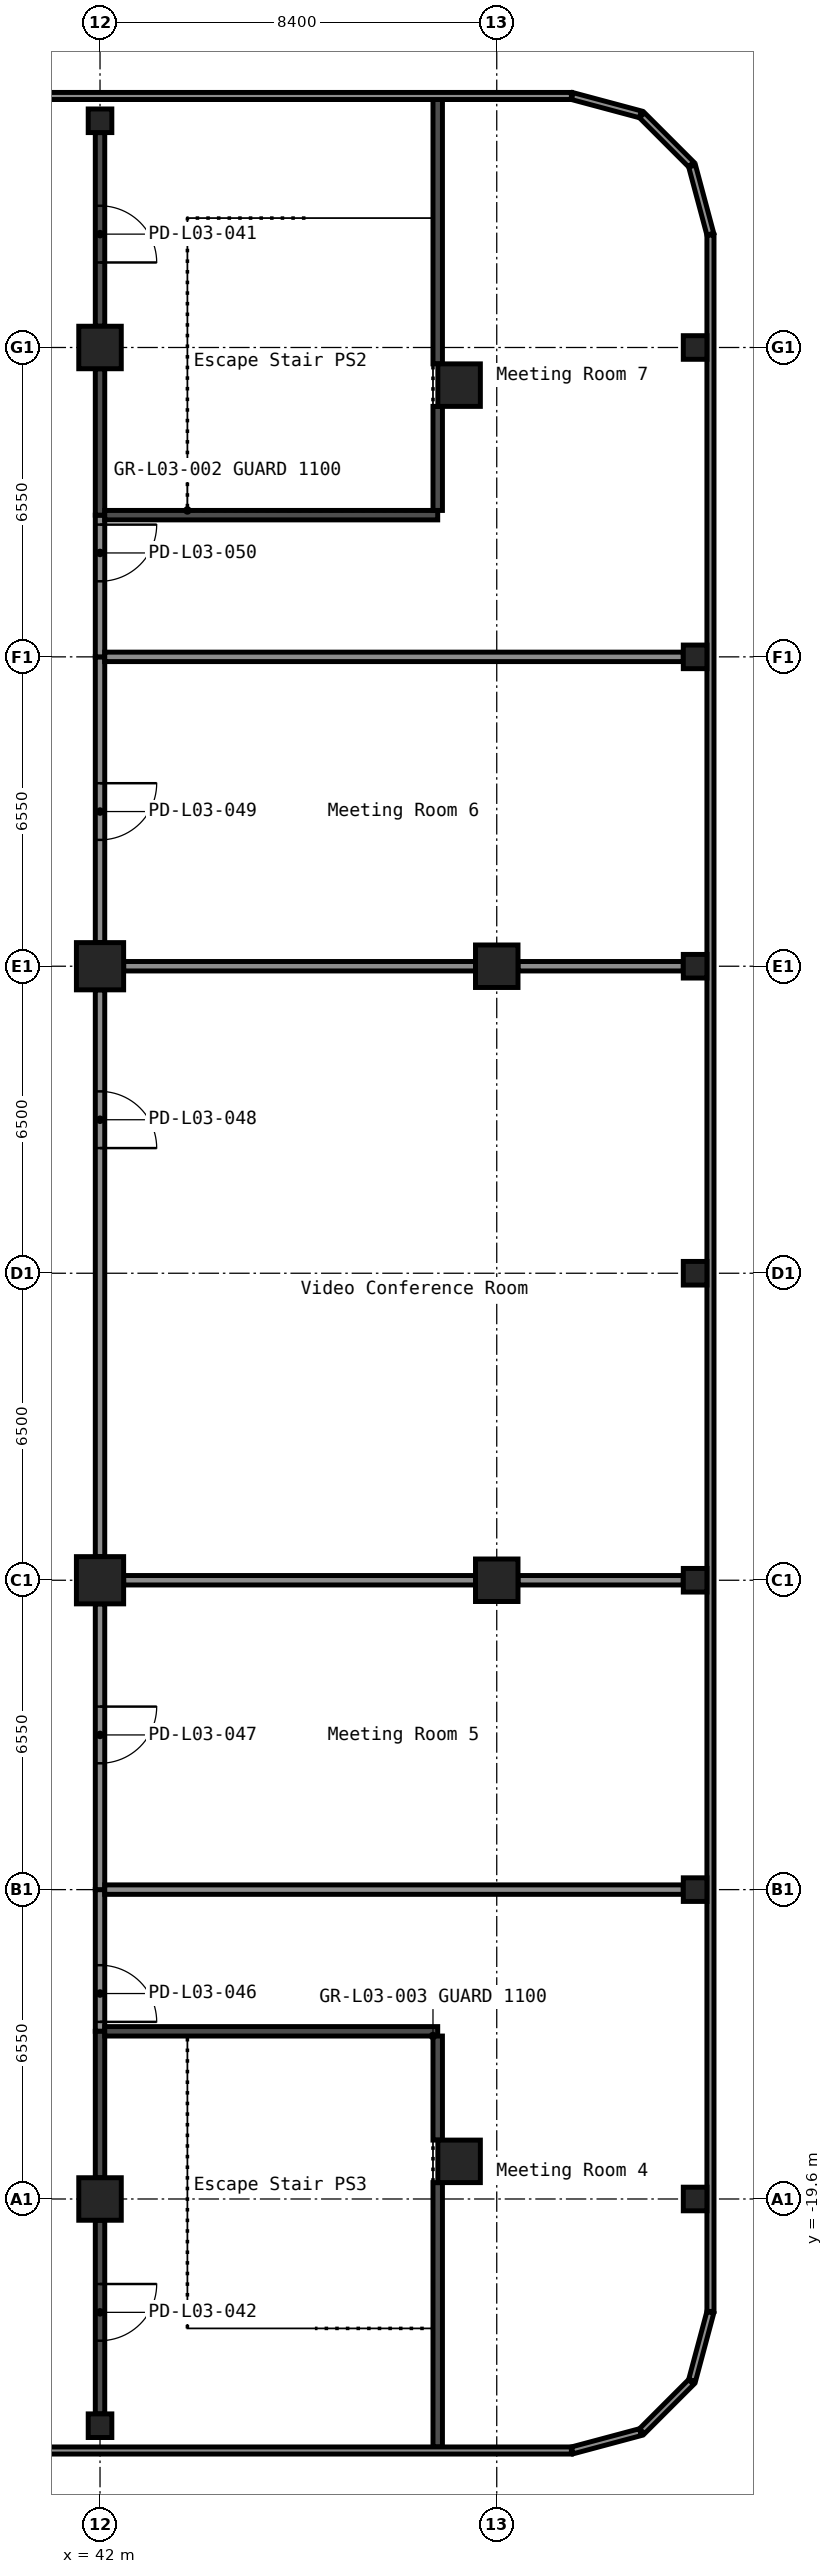
"""IFC4 building model, lengths in metres.
Left out: names, types, materials, properties, quantities, classifications, styles, units other than length and angle.
Written with IfcOpenShell. Run it as: python <this file> out.ifc"""

import sys

from ifc_helpers import new_model, si_unit, direction, frame, frame_2d, origin, origin_2d, place, context, subcontext, project, spatial, rectangle, hollow_rectangle, extrude, element, fill, save


model = new_model("IFC4")
c1 = context("Model", 3, precision=1e-05, world=origin(), true_north=direction((0.0, 1.0)))
c2 = subcontext(c1, "Body", "Model", "MODEL_VIEW")
j1 = project(units=[si_unit("LENGTHUNIT", "METRE"), si_unit("PLANEANGLEUNIT", "RADIAN")], contexts=[c1])
p1 = place(None, origin())
s1 = spatial("IfcSite", under=j1, at=p1, CompositionType="ELEMENT")
p2 = place(p1, origin())
s2 = spatial("IfcBuilding", under=s1, at=p2, CompositionType="ELEMENT")
p3 = place(p2, frame((0.0, 0.0, 15.0)))
s3 = spatial("IfcBuildingStorey", under=s2, at=p3, CompositionType="ELEMENT", Elevation=15.0)
p4 = place(p3, frame((42.0, -19.6, 0.0), z_axis=(0.0, 0.0, 1.0), x_axis=(1.0, 0.0, 0.0)))
e1 = element("IfcColumn", 1, at=p4, inside=s3, PredefinedType="COLUMN", context=c2, shape_type="SweptSolid", body=[
    extrude(hollow_rectangle(XDim=0.9, YDim=0.9, WallThickness=0.036, at=origin_2d()), origin(), (0.0, 0.0, 1.0), 4.4),
])
for number, where, z_axis, x_axis in (
    (2, (42.0, -6.5, 0.0), (0.0, 0.0, 1.0), (1.0, 0.0, 0.0)),
    (3, (42.0, 6.5, 0.0), (0.0, 0.0, 1.0), (1.0, 0.0, 0.0)),
):
    element("IfcColumn", number, at=place(p3, frame(where, z_axis=z_axis, x_axis=x_axis)), inside=s3, PredefinedType="COLUMN", context=c2, shape_type="SweptSolid", body=[
        extrude(hollow_rectangle(XDim=1.0, YDim=1.0, WallThickness=0.04, at=origin_2d()), origin(), (0.0, 0.0, 1.0), 4.4),
    ])
for number, where, z_axis, x_axis in (
    (4, (42.0, 19.6, 0.0), (0.0, 0.0, 1.0), (1.0, 0.0, 0.0)),
    (5, (49.603, -18.803, 0.0), (0.0, 0.0, 1.0), (1.0, 0.0, 0.0)),
    (6, (50.4, -6.5, 0.0), (0.0, 0.0, 1.0), (1.0, 0.0, 0.0)),
    (7, (50.4, 6.5, 0.0), (0.0, 0.0, 1.0), (1.0, 0.0, 0.0)),
    (8, (49.603, 18.803, 0.0), (0.0, 0.0, 1.0), (1.0, 0.0, 0.0)),
):
    element("IfcColumn", number, at=place(p3, frame(where, z_axis=z_axis, x_axis=x_axis)), inside=s3, PredefinedType="COLUMN", context=c2, shape_type="SweptSolid", body=[
        extrude(hollow_rectangle(XDim=0.9, YDim=0.9, WallThickness=0.036, at=origin_2d()), origin(), (0.0, 0.0, 1.0), 4.4),
    ])
for number, where, z_axis, x_axis in (
    (9, (42.0, -24.4, 0.0), (0.0, 0.0, 1.0), (1.0, 0.0, 0.0)),
    (10, (42.0, 24.4, 0.0), (0.0, 0.0, 1.0), (1.0, 0.0, 0.0)),
    (11, (54.6, -19.6, 0.0), (0.0, 0.0, 1.0), (1.0, 0.0, 0.0)),
    (12, (54.6, -13.05, 0.0), (0.0, 0.0, 1.0), (1.0, 0.0, 0.0)),
    (13, (54.6, -6.5, 0.0), (0.0, 0.0, 1.0), (1.0, 0.0, 0.0)),
    (14, (54.6, 0.0, 0.0), (0.0, 0.0, 1.0), (1.0, 0.0, 0.0)),
    (15, (54.6, 6.5, 0.0), (0.0, 0.0, 1.0), (1.0, 0.0, 0.0)),
    (16, (54.6, 13.05, 0.0), (0.0, 0.0, 1.0), (1.0, 0.0, 0.0)),
    (17, (54.6, 19.6, 0.0), (0.0, 0.0, 1.0), (1.0, 0.0, 0.0)),
):
    element("IfcColumn", number, at=place(p3, frame(where, z_axis=z_axis, x_axis=x_axis)), inside=s3, PredefinedType="COLUMN", context=c2, shape_type="SweptSolid", body=[
        extrude(hollow_rectangle(XDim=0.5, YDim=0.5, WallThickness=0.019, InnerFilletRadius=0.029, OuterFilletRadius=0.048, at=origin_2d()), origin(), (0.0, 0.0, 1.0), 4.4),
    ])
p5 = place(p3, frame((42.0, -13.05, 0.0), z_axis=(0.0, 0.0, 1.0), x_axis=(0.0, -1.0, 0.0)))
e18 = element("IfcWall", 18, at=p5, inside=s3, PredefinedType="PARTITIONING", context=c2, shape_type="SweptSolid", body=[
    extrude(rectangle(XDim=3.0, YDim=0.2, at=frame_2d((1.5, 0.0))), origin(), (0.0, 0.0, 1.0), 4.4),
])
p6 = place(p5, frame((1.6, 0.0, 0.0)))
e19 = element("IfcOpeningElement", 19, at=p6, cuts=e18, PredefinedType="OPENING", context=c2, shape_type="SweptSolid", body=[
    extrude(rectangle(XDim=1.2, YDim=2.1, at=frame_2d((0.6, 1.05))), frame((0.0, 0.11, 0.0), z_axis=(0.0, -1.0, 0.0), x_axis=(1.0, 0.0, 0.0)), (0.0, 0.0, 1.0), 0.22),
])
p7 = place(p3, frame((42.0, -7.0, 0.0), z_axis=(0.0, 0.0, 1.0), x_axis=(0.0, -1.0, 0.0)))
e20 = element("IfcWall", 20, at=p7, inside=s3, PredefinedType="PARTITIONING", context=c2, shape_type="SweptSolid", body=[
    extrude(rectangle(XDim=6.05, YDim=0.2, at=frame_2d((3.025, 0.0))), origin(), (0.0, 0.0, 1.0), 4.4),
])
p8 = place(p7, frame((2.175, 0.0, 0.0)))
e21 = element("IfcOpeningElement", 21, at=p8, cuts=e20, PredefinedType="OPENING", context=c2, shape_type="SweptSolid", body=[
    extrude(rectangle(XDim=1.2, YDim=2.1, at=frame_2d((0.6, 1.05))), frame((0.0, 0.11, 0.0), z_axis=(0.0, -1.0, 0.0), x_axis=(1.0, 0.0, 0.0)), (0.0, 0.0, 1.0), 0.22),
])
p9 = place(p3, frame((42.0, 13.05, 0.0), z_axis=(0.0, 0.0, 1.0), x_axis=(0.0, -1.0, 0.0)))
e22 = element("IfcWall", 22, at=p9, inside=s3, PredefinedType="PARTITIONING", context=c2, shape_type="SweptSolid", body=[
    extrude(rectangle(XDim=6.05, YDim=0.2, at=frame_2d((3.025, 0.0))), origin(), (0.0, 0.0, 1.0), 4.4),
])
p10 = place(p9, frame((2.675, 0.0, 0.0)))
e23 = element("IfcOpeningElement", 23, at=p10, cuts=e22, PredefinedType="OPENING", context=c2, shape_type="SweptSolid", body=[
    extrude(rectangle(XDim=1.2, YDim=2.1, at=frame_2d((0.6, 1.05))), frame((0.0, 0.11, 0.0), z_axis=(0.0, -1.0, 0.0), x_axis=(1.0, 0.0, 0.0)), (0.0, 0.0, 1.0), 0.22),
])
p11 = place(p3, frame((42.0, 16.05, 0.0), z_axis=(0.0, 0.0, 1.0), x_axis=(0.0, -1.0, 0.0)))
e24 = element("IfcWall", 24, at=p11, inside=s3, PredefinedType="PARTITIONING", context=c2, shape_type="SweptSolid", body=[
    extrude(rectangle(XDim=3.0, YDim=0.2, at=frame_2d((1.5, 0.0))), origin(), (0.0, 0.0, 1.0), 4.4),
])
p12 = place(p11, frame((0.2, 0.0, 0.0)))
e25 = element("IfcOpeningElement", 25, at=p12, cuts=e24, PredefinedType="OPENING", context=c2, shape_type="SweptSolid", body=[
    extrude(rectangle(XDim=1.2, YDim=2.1, at=frame_2d((0.6, 1.05))), frame((0.0, 0.11, 0.0), z_axis=(0.0, -1.0, 0.0), x_axis=(1.0, 0.0, 0.0)), (0.0, 0.0, 1.0), 0.22),
])
p13 = place(p3, frame((42.0, 6.0, 0.0), z_axis=(0.0, 0.0, 1.0), x_axis=(0.0, -1.0, 0.0)))
e26 = element("IfcWall", 26, at=p13, inside=s3, PredefinedType="PARTITIONING", context=c2, shape_type="SweptSolid", body=[
    extrude(rectangle(XDim=12.0, YDim=0.2, at=frame_2d((6.0, 0.0))), origin(), (0.0, 0.0, 1.0), 4.4),
])
p14 = place(p13, frame((2.15, 0.0, 0.0)))
e27 = element("IfcOpeningElement", 27, at=p14, cuts=e26, PredefinedType="OPENING", context=c2, shape_type="SweptSolid", body=[
    extrude(rectangle(XDim=1.2, YDim=2.1, at=frame_2d((0.6, 1.05))), frame((0.0, 0.11, 0.0), z_axis=(0.0, -1.0, 0.0), x_axis=(1.0, 0.0, 0.0)), (0.0, 0.0, 1.0), 0.22),
])
p15 = place(p3, frame((42.1, -13.05, 0.0), z_axis=(0.0, 0.0, 1.0), x_axis=(1.0, 0.0, 0.0)))
e28 = element("IfcWall", 28, at=p15, inside=s3, PredefinedType="PARTITIONING", context=c2, shape_type="SweptSolid", body=[
    extrude(rectangle(XDim=12.25, YDim=0.2, at=frame_2d((6.125, 0.0))), origin(), (0.0, 0.0, 1.0), 4.4),
])
p16 = place(p3, frame((42.5, -6.5, 0.0), z_axis=(0.0, 0.0, 1.0), x_axis=(1.0, 0.0, 0.0)))
e29 = element("IfcWall", 29, at=p16, inside=s3, PredefinedType="PARTITIONING", context=c2, shape_type="SweptSolid", body=[
    extrude(rectangle(XDim=7.45, YDim=0.2, at=frame_2d((3.725, 0.0))), origin(), (0.0, 0.0, 1.0), 4.4),
])
p17 = place(p3, frame((50.85, -6.5, 0.0), z_axis=(0.0, 0.0, 1.0), x_axis=(1.0, 0.0, 0.0)))
e30 = element("IfcWall", 30, at=p17, inside=s3, PredefinedType="PARTITIONING", context=c2, shape_type="SweptSolid", body=[
    extrude(rectangle(XDim=3.5, YDim=0.2, at=frame_2d((1.75, 0.0))), origin(), (0.0, 0.0, 1.0), 4.4),
])
p18 = place(p3, frame((42.1, 13.05, 0.0), z_axis=(0.0, 0.0, 1.0), x_axis=(1.0, 0.0, 0.0)))
e31 = element("IfcWall", 31, at=p18, inside=s3, PredefinedType="PARTITIONING", context=c2, shape_type="SweptSolid", body=[
    extrude(rectangle(XDim=12.25, YDim=0.2, at=frame_2d((6.125, 0.0))), origin(), (0.0, 0.0, 1.0), 4.4),
])
p19 = place(p3, frame((42.0, 16.05, 0.0), z_axis=(0.0, 0.0, 1.0), x_axis=(0.0, 1.0, 0.0)))
e32 = element("IfcWall", 32, at=p19, inside=s3, PredefinedType="SHEAR", context=c2, shape_type="SweptSolid", body=[
    extrude(rectangle(XDim=3.1, YDim=0.2, at=frame_2d((1.55, 0.0))), origin(), (0.0, 0.0, 1.0), 4.4),
])
p20 = place(p3, frame((42.0, 20.05, 0.0), z_axis=(0.0, 0.0, 1.0), x_axis=(0.0, 1.0, 0.0)))
e33 = element("IfcWall", 33, at=p20, inside=s3, PredefinedType="SHEAR", context=c2, shape_type="SweptSolid", body=[
    extrude(rectangle(XDim=4.1, YDim=0.2, at=frame_2d((2.05, 0.0))), origin(), (0.0, 0.0, 1.0), 4.4),
])
p21 = place(p20, frame((1.35, 0.0, 0.0)))
e34 = element("IfcOpeningElement", 34, at=p21, cuts=e33, PredefinedType="OPENING", context=c2, shape_type="SweptSolid", body=[
    extrude(rectangle(XDim=1.2, YDim=2.1, at=frame_2d((0.6, 1.05))), frame((0.0, 0.11, 0.0), z_axis=(0.0, -1.0, 0.0), x_axis=(1.0, 0.0, 0.0)), (0.0, 0.0, 1.0), 0.22),
])
p22 = place(p3, frame((49.15, 16.05, 0.0), z_axis=(0.0, 0.0, 1.0), x_axis=(-1.0, 0.0, 0.0)))
e35 = element("IfcWall", 35, at=p22, inside=s3, PredefinedType="SHEAR", context=c2, shape_type="SweptSolid", body=[
    extrude(rectangle(XDim=7.05, YDim=0.2, at=frame_2d((3.525, 0.0))), origin(), (0.0, 0.0, 1.0), 4.4),
])
p23 = place(p3, frame((49.15, 24.85, 0.0), z_axis=(0.0, 0.0, 1.0), x_axis=(0.0, -1.0, 0.0)))
e36 = element("IfcWall", 36, at=p23, inside=s3, PredefinedType="SHEAR", context=c2, shape_type="SweptSolid", body=[
    extrude(rectangle(XDim=5.597, YDim=0.2, at=frame_2d((2.798, 0.0))), origin(), (0.0, 0.0, 1.0), 4.4),
])
p24 = place(p3, frame((49.15, 18.353, 0.0), z_axis=(0.0, 0.0, 1.0), x_axis=(0.0, -1.0, 0.0)))
e37 = element("IfcWall", 37, at=p24, inside=s3, PredefinedType="SHEAR", context=c2, shape_type="SweptSolid", body=[
    extrude(rectangle(XDim=2.203, YDim=0.2, at=frame_2d((1.102, 0.0))), origin(), (0.0, 0.0, 1.0), 4.4),
])
p25 = place(p3, frame((42.0, -24.15, 0.0), z_axis=(0.0, 0.0, 1.0), x_axis=(0.0, 1.0, 0.0)))
e38 = element("IfcWall", 38, at=p25, inside=s3, PredefinedType="SHEAR", context=c2, shape_type="SweptSolid", body=[
    extrude(rectangle(XDim=4.1, YDim=0.2, at=frame_2d((2.05, 0.0))), origin(), (0.0, 0.0, 1.0), 4.4),
])
p26 = place(p25, frame((1.55, 0.0, 0.0)))
e39 = element("IfcOpeningElement", 39, at=p26, cuts=e38, PredefinedType="OPENING", context=c2, shape_type="SweptSolid", body=[
    extrude(rectangle(XDim=1.2, YDim=2.1, at=frame_2d((0.6, 1.05))), frame((0.0, 0.11, 0.0), z_axis=(0.0, -1.0, 0.0), x_axis=(1.0, 0.0, 0.0)), (0.0, 0.0, 1.0), 0.22),
])
p27 = place(p3, frame((42.0, -19.15, 0.0), z_axis=(0.0, 0.0, 1.0), x_axis=(0.0, 1.0, 0.0)))
e40 = element("IfcWall", 40, at=p27, inside=s3, PredefinedType="SHEAR", context=c2, shape_type="SweptSolid", body=[
    extrude(rectangle(XDim=3.1, YDim=0.2, at=frame_2d((1.55, 0.0))), origin(), (0.0, 0.0, 1.0), 4.4),
])
p28 = place(p3, frame((42.1, -16.05, 0.0), z_axis=(0.0, 0.0, 1.0), x_axis=(1.0, 0.0, 0.0)))
e41 = element("IfcWall", 41, at=p28, inside=s3, PredefinedType="SHEAR", context=c2, shape_type="SweptSolid", body=[
    extrude(rectangle(XDim=7.05, YDim=0.2, at=frame_2d((3.525, 0.0))), origin(), (0.0, 0.0, 1.0), 4.4),
])
p29 = place(p3, frame((49.15, -16.15, 0.0), z_axis=(0.0, 0.0, 1.0), x_axis=(0.0, -1.0, 0.0)))
e42 = element("IfcWall", 42, at=p29, inside=s3, PredefinedType="SHEAR", context=c2, shape_type="SweptSolid", body=[
    extrude(rectangle(XDim=2.203, YDim=0.2, at=frame_2d((1.102, 0.0))), origin(), (0.0, 0.0, 1.0), 4.4),
])
p30 = place(p3, frame((49.15, -19.253, 0.0), z_axis=(0.0, 0.0, 1.0), x_axis=(0.0, -1.0, 0.0)))
e43 = element("IfcWall", 43, at=p30, inside=s3, PredefinedType="SHEAR", context=c2, shape_type="SweptSolid", body=[
    extrude(rectangle(XDim=5.597, YDim=0.2, at=frame_2d((2.798, 0.0))), origin(), (0.0, 0.0, 1.0), 4.4),
])
p31 = place(p3, frame((42.5, 6.5, 0.0), z_axis=(0.0, 0.0, 1.0), x_axis=(1.0, 0.0, 0.0)))
e44 = element("IfcWall", 44, at=p31, inside=s3, PredefinedType="PARTITIONING", context=c2, shape_type="SweptSolid", body=[
    extrude(rectangle(XDim=7.45, YDim=0.2, at=frame_2d((3.725, 0.0))), origin(), (0.0, 0.0, 1.0), 4.4),
])
p32 = place(p3, frame((50.85, 6.5, 0.0), z_axis=(0.0, 0.0, 1.0), x_axis=(1.0, 0.0, 0.0)))
e45 = element("IfcWall", 45, at=p32, inside=s3, PredefinedType="PARTITIONING", context=c2, shape_type="SweptSolid", body=[
    extrude(rectangle(XDim=3.5, YDim=0.2, at=frame_2d((1.75, 0.0))), origin(), (0.0, 0.0, 1.0), 4.4),
])
p33 = place(p3, frame((54.922, -22.0, 0.0), z_axis=(0.0, 0.0, 1.0), x_axis=(-0.258741535379, -0.965946591624, 0.0)))
e46 = element("IfcWall", 46, at=p33, inside=s3, PredefinedType="STANDARD", context=c2, shape_type="SweptSolid", body=[
    extrude(rectangle(XDim=1.493, YDim=0.15, at=frame_2d((0.746, 0.0))), origin(), (0.0, 0.0, 1.0), 4.4),
])
p34 = place(p3, frame((54.517, -23.475, 0.0), z_axis=(0.0, 0.0, 1.0), x_axis=(-0.707106781187, -0.707106781187, 0.0)))
e47 = element("IfcWall", 47, at=p34, inside=s3, PredefinedType="STANDARD", context=c2, shape_type="SweptSolid", body=[
    extrude(rectangle(XDim=1.473, YDim=0.15, at=frame_2d((0.736, 0.0))), origin(), (0.0, 0.0, 1.0), 4.4),
])
p35 = place(p3, frame((53.442, -24.536, 0.0), z_axis=(0.0, 0.0, 1.0), x_axis=(-0.965946591624, -0.258741535379, 0.0)))
e48 = element("IfcWall", 48, at=p35, inside=s3, PredefinedType="STANDARD", context=c2, shape_type="SweptSolid", body=[
    extrude(rectangle(XDim=1.493, YDim=0.15, at=frame_2d((0.746, 0.0))), origin(), (0.0, 0.0, 1.0), 4.4),
])
p36 = place(p3, frame((51.98, -24.925, 0.0), z_axis=(0.0, 0.0, 1.0), x_axis=(-1.0, 0.0, 0.0)))
e49 = element("IfcWall", 49, at=p36, inside=s3, PredefinedType="STANDARD", context=c2, shape_type="SweptSolid", body=[
    extrude(rectangle(XDim=35.18, YDim=0.15, at=frame_2d((17.59, 0.0))), origin(), (0.0, 0.0, 1.0), 4.4),
])
p37 = place(p3, frame((39.0, 24.925, 0.0), z_axis=(0.0, 0.0, 1.0), x_axis=(1.0, 0.0, 0.0)))
e50 = element("IfcWall", 50, at=p37, inside=s3, PredefinedType="STANDARD", context=c2, shape_type="SweptSolid", body=[
    extrude(rectangle(XDim=12.98, YDim=0.15, at=frame_2d((6.49, 0.0))), origin(), (0.0, 0.0, 1.0), 4.4),
])
p38 = place(p3, frame((52.0, 24.922, 0.0), z_axis=(0.0, 0.0, 1.0), x_axis=(0.965946591624, -0.258741535379, 0.0)))
e51 = element("IfcWall", 51, at=p38, inside=s3, PredefinedType="STANDARD", context=c2, shape_type="SweptSolid", body=[
    extrude(rectangle(XDim=1.493, YDim=0.15, at=frame_2d((0.746, 0.0))), origin(), (0.0, 0.0, 1.0), 4.4),
])
p39 = place(p3, frame((53.475, 24.517, 0.0), z_axis=(0.0, 0.0, 1.0), x_axis=(0.707106781187, -0.707106781187, 0.0)))
e52 = element("IfcWall", 52, at=p39, inside=s3, PredefinedType="STANDARD", context=c2, shape_type="SweptSolid", body=[
    extrude(rectangle(XDim=1.473, YDim=0.15, at=frame_2d((0.736, 0.0))), origin(), (0.0, 0.0, 1.0), 4.4),
])
p40 = place(p3, frame((54.536, 23.442, 0.0), z_axis=(0.0, 0.0, 1.0), x_axis=(0.258741535379, -0.965946591624, 0.0)))
e53 = element("IfcWall", 53, at=p40, inside=s3, PredefinedType="STANDARD", context=c2, shape_type="SweptSolid", body=[
    extrude(rectangle(XDim=1.493, YDim=0.15, at=frame_2d((0.746, 0.0))), origin(), (0.0, 0.0, 1.0), 4.4),
])
p41 = place(p3, frame((54.925, 21.98, 0.0), z_axis=(0.0, 0.0, 1.0), x_axis=(0.0, -1.0, 0.0)))
e54 = element("IfcWall", 54, at=p41, inside=s3, PredefinedType="STANDARD", context=c2, shape_type="SweptSolid", body=[
    extrude(rectangle(XDim=43.96, YDim=0.15, at=frame_2d((21.98, 0.0))), origin(), (0.0, 0.0, 1.0), 4.4),
])
p42 = place(p21, origin())
e55 = element("IfcDoor", 55, at=p42, inside=s3, OperationType="SINGLE_SWING_LEFT", PredefinedType="DOOR", context=c2, shape_type="SweptSolid", body=[
    extrude(rectangle(XDim=1.2, YDim=2.1, at=frame_2d((0.6, 1.05))), frame((0.0, 0.025, 0.0), z_axis=(0.0, -1.0, 0.0), x_axis=(1.0, 0.0, 0.0)), (0.0, 0.0, 1.0), 0.05),
])
fill(e34, e55)
p43 = place(p26, origin())
e56 = element("IfcDoor", 56, at=p43, inside=s3, OperationType="SINGLE_SWING_RIGHT", PredefinedType="DOOR", context=c2, shape_type="SweptSolid", body=[
    extrude(rectangle(XDim=1.2, YDim=2.1, at=frame_2d((0.6, 1.05))), frame((0.0, 0.025, 0.0), z_axis=(0.0, -1.0, 0.0), x_axis=(1.0, 0.0, 0.0)), (0.0, 0.0, 1.0), 0.05),
])
fill(e39, e56)
p44 = place(p6, origin())
e57 = element("IfcDoor", 57, at=p44, inside=s3, OperationType="SINGLE_SWING_LEFT", PredefinedType="DOOR", context=c2, shape_type="SweptSolid", body=[
    extrude(rectangle(XDim=1.2, YDim=2.1, at=frame_2d((0.6, 1.05))), frame((0.0, 0.025, 0.0), z_axis=(0.0, -1.0, 0.0), x_axis=(1.0, 0.0, 0.0)), (0.0, 0.0, 1.0), 0.05),
])
fill(e19, e57)
p45 = place(p8, origin())
e58 = element("IfcDoor", 58, at=p45, inside=s3, OperationType="SINGLE_SWING_RIGHT", PredefinedType="DOOR", context=c2, shape_type="SweptSolid", body=[
    extrude(rectangle(XDim=1.2, YDim=2.1, at=frame_2d((0.6, 1.05))), frame((0.0, 0.025, 0.0), z_axis=(0.0, -1.0, 0.0), x_axis=(1.0, 0.0, 0.0)), (0.0, 0.0, 1.0), 0.05),
])
fill(e21, e58)
p46 = place(p14, origin())
e59 = element("IfcDoor", 59, at=p46, inside=s3, OperationType="SINGLE_SWING_LEFT", PredefinedType="DOOR", context=c2, shape_type="SweptSolid", body=[
    extrude(rectangle(XDim=1.2, YDim=2.1, at=frame_2d((0.6, 1.05))), frame((0.0, 0.025, 0.0), z_axis=(0.0, -1.0, 0.0), x_axis=(1.0, 0.0, 0.0)), (0.0, 0.0, 1.0), 0.05),
])
fill(e27, e59)
p47 = place(p10, origin())
e60 = element("IfcDoor", 60, at=p47, inside=s3, OperationType="SINGLE_SWING_RIGHT", PredefinedType="DOOR", context=c2, shape_type="SweptSolid", body=[
    extrude(rectangle(XDim=1.2, YDim=2.1, at=frame_2d((0.6, 1.05))), frame((0.0, 0.025, 0.0), z_axis=(0.0, -1.0, 0.0), x_axis=(1.0, 0.0, 0.0)), (0.0, 0.0, 1.0), 0.05),
])
fill(e23, e60)
p48 = place(p12, origin())
e61 = element("IfcDoor", 61, at=p48, inside=s3, OperationType="SINGLE_SWING_RIGHT", PredefinedType="DOOR", context=c2, shape_type="SweptSolid", body=[
    extrude(rectangle(XDim=1.2, YDim=2.1, at=frame_2d((0.6, 1.05))), frame((0.0, 0.025, 0.0), z_axis=(0.0, -1.0, 0.0), x_axis=(1.0, 0.0, 0.0)), (0.0, 0.0, 1.0), 0.05),
])
fill(e25, e61)
save(model, sys.argv[1])
